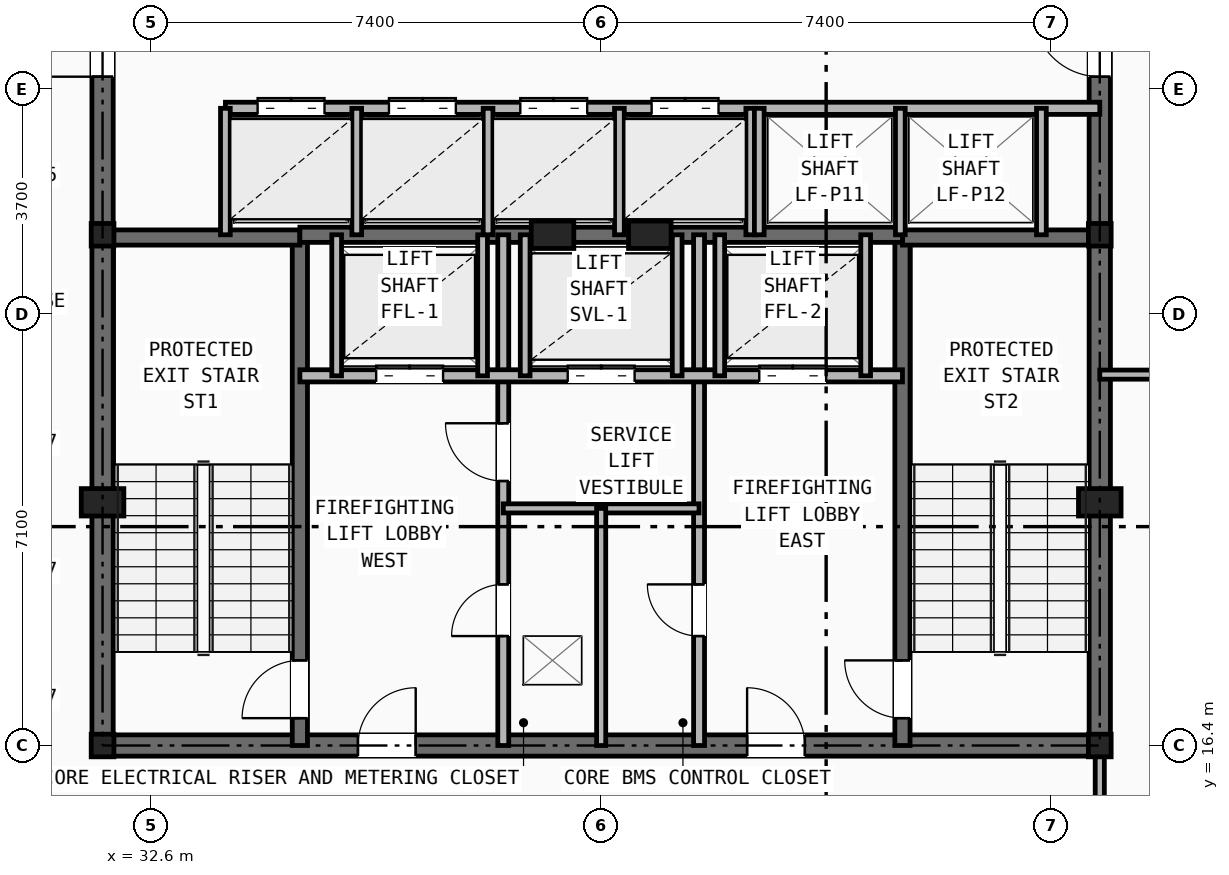
"""IFC4 building model, lengths in metres.
Left out: names, types, materials, properties, quantities, classifications, styles, units other than length and angle.
Written with IfcOpenShell. Run it as: python <this file> out.ifc"""

import sys

from ifc_helpers import new_model, si_unit, direction, frame, frame_2d, origin, origin_2d, place, context, subcontext, project, spatial, rectangle, i_section, extrude, element, fill, save


model = new_model("IFC4")
c1 = context("Model", 3, precision=1e-05, world=origin(), true_north=direction((0.0, 1.0)))
c2 = subcontext(c1, "Body", "Model", "MODEL_VIEW")
j1 = project(units=[si_unit("LENGTHUNIT", "METRE"), si_unit("PLANEANGLEUNIT", "RADIAN")], contexts=[c1])
p1 = place(None, origin())
s1 = spatial("IfcSite", under=j1, at=p1, CompositionType="ELEMENT")
p2 = place(p1, origin())
s2 = spatial("IfcBuilding", under=s1, at=p2, CompositionType="ELEMENT")
p3 = place(p2, frame((0.0, 0.0, 196.5)))
s3 = spatial("IfcBuildingStorey", under=s2, at=p3, CompositionType="ELEMENT", Elevation=196.5)
for number, where, z_axis, x_axis in (
    (1, (31.8, 16.4, 0.0), (0.0, 0.0, 1.0), (1.0, 0.0, 0.0)),
    (2, (48.2, 16.4, 0.0), (0.0, 0.0, 1.0), (1.0, 0.0, 0.0)),
    (3, (31.8, 24.8, 0.0), (0.0, 0.0, 1.0), (1.0, 0.0, 0.0)),
    (4, (48.2, 24.8, 0.0), (0.0, 0.0, 1.0), (1.0, 0.0, 0.0)),
):
    element("IfcColumn", number, at=place(p3, frame(where, z_axis=z_axis, x_axis=x_axis)), inside=s3, PredefinedType="COLUMN", context=c2, shape_type="SweptSolid", body=[
        extrude(i_section(OverallWidth=0.374, OverallDepth=0.372, WebThickness=0.016, FlangeThickness=0.026, at=origin_2d()), origin(), (0.0, 0.0, 1.0), 4.2),
    ])
for number, where, z_axis, x_axis in (
    (5, (31.8, 20.4, 0.0), (0.0, 0.0, 1.0), (1.0, 0.0, 0.0)),
    (6, (48.2, 20.4, 0.0), (0.0, 0.0, 1.0), (1.0, 0.0, 0.0)),
    (7, (39.2, 24.8, 0.0), (0.0, 0.0, 1.0), (1.0, 0.0, 0.0)),
    (8, (40.8, 24.8, 0.0), (0.0, 0.0, 1.0), (1.0, 0.0, 0.0)),
):
    element("IfcColumn", number, at=place(p3, frame(where, z_axis=z_axis, x_axis=x_axis)), inside=s3, PredefinedType="PILASTER", context=c2, shape_type="SweptSolid", body=[
        extrude(rectangle(XDim=0.7, YDim=0.45, at=origin_2d()), origin(), (0.0, 0.0, 1.0), 4.2),
    ])
p4 = place(p3, frame((31.8, 16.4, 0.0), z_axis=(0.0, 0.0, 1.0), x_axis=(1.0, 0.0, 0.0)))
e9 = element("IfcWall", 9, at=p4, inside=s3, PredefinedType="SHEAR", context=c2, shape_type="SweptSolid", body=[
    extrude(rectangle(XDim=16.4, YDim=0.35, at=frame_2d((8.2, 0.0))), origin(), (0.0, 0.0, 1.0), 3.94),
])
p5 = place(p4, frame((4.2, 0.0, 0.0)))
e10 = element("IfcOpeningElement", 10, at=p5, cuts=e9, PredefinedType="OPENING", context=c2, shape_type="SweptSolid", body=[
    extrude(rectangle(XDim=0.95, YDim=2.1, at=frame_2d((0.475, 1.05))), frame((0.0, 0.185, 0.0), z_axis=(0.0, -1.0, 0.0), x_axis=(1.0, 0.0, 0.0)), (0.0, 0.0, 1.0), 0.37),
])
p6 = place(p4, frame((10.6, 0.0, 0.0)))
e11 = element("IfcOpeningElement", 11, at=p6, cuts=e9, PredefinedType="OPENING", context=c2, shape_type="SweptSolid", body=[
    extrude(rectangle(XDim=0.95, YDim=2.1, at=frame_2d((0.475, 1.05))), frame((0.0, 0.185, 0.0), z_axis=(0.0, -1.0, 0.0), x_axis=(1.0, 0.0, 0.0)), (0.0, 0.0, 1.0), 0.37),
])
p7 = place(p3, frame((31.8, 16.4, 0.0), z_axis=(0.0, 0.0, 1.0), x_axis=(0.0, 1.0, 0.0)))
e12 = element("IfcWall", 12, at=p7, inside=s3, PredefinedType="SHEAR", context=c2, shape_type="SweptSolid", body=[
    extrude(rectangle(XDim=14.8, YDim=0.35, at=frame_2d((7.4, 0.0))), origin(), (0.0, 0.0, 1.0), 3.94),
])
p8 = place(p7, frame((11.0, 0.0, 0.0)))
e13 = element("IfcOpeningElement", 13, at=p8, cuts=e12, PredefinedType="OPENING", context=c2, shape_type="SweptSolid", body=[
    extrude(rectangle(XDim=1.1, YDim=2.15, at=frame_2d((0.55, 1.075))), frame((0.0, 0.185, 0.0), z_axis=(0.0, -1.0, 0.0), x_axis=(1.0, 0.0, 0.0)), (0.0, 0.0, 1.0), 0.37),
])
p9 = place(p3, frame((48.2, 16.4, 0.0), z_axis=(0.0, 0.0, 1.0), x_axis=(0.0, 1.0, 0.0)))
e14 = element("IfcWall", 14, at=p9, inside=s3, PredefinedType="SHEAR", context=c2, shape_type="SweptSolid", body=[
    extrude(rectangle(XDim=14.8, YDim=0.35, at=frame_2d((7.4, 0.0))), origin(), (0.0, 0.0, 1.0), 3.94),
])
p10 = place(p9, frame((11.0, 0.0, 0.0)))
e15 = element("IfcOpeningElement", 15, at=p10, cuts=e14, PredefinedType="OPENING", context=c2, shape_type="SweptSolid", body=[
    extrude(rectangle(XDim=1.1, YDim=2.15, at=frame_2d((0.55, 1.075))), frame((0.0, 0.185, 0.0), z_axis=(0.0, -1.0, 0.0), x_axis=(1.0, 0.0, 0.0)), (0.0, 0.0, 1.0), 0.37),
])
p11 = place(p3, frame((35.045, 16.4, 0.0), z_axis=(0.0, 0.0, 1.0), x_axis=(0.0, 1.0, 0.0)))
e16 = element("IfcWall", 16, at=p11, inside=s3, PredefinedType="SHEAR", context=c2, shape_type="SweptSolid", body=[
    extrude(rectangle(XDim=8.4, YDim=0.25, at=frame_2d((4.2, 0.0))), origin(), (0.0, 0.0, 1.0), 3.94),
])
p12 = place(p11, frame((0.45, 0.0, 0.0)))
e17 = element("IfcOpeningElement", 17, at=p12, cuts=e16, PredefinedType="OPENING", context=c2, shape_type="SweptSolid", body=[
    extrude(rectangle(XDim=0.95, YDim=2.1, at=frame_2d((0.475, 1.05))), frame((0.0, 0.135, 0.0), z_axis=(0.0, -1.0, 0.0), x_axis=(1.0, 0.0, 0.0)), (0.0, 0.0, 1.0), 0.27),
])
p13 = place(p3, frame((31.8, 24.755, 0.0), z_axis=(0.0, 0.0, 1.0), x_axis=(1.0, 0.0, 0.0)))
e18 = element("IfcWall", 18, at=p13, inside=s3, PredefinedType="SHEAR", context=c2, shape_type="SweptSolid", body=[
    extrude(rectangle(XDim=3.245, YDim=0.25, at=frame_2d((1.623, 0.0))), origin(), (0.0, 0.0, 1.0), 3.94),
])
p14 = place(p3, frame((44.955, 16.4, 0.0), z_axis=(0.0, 0.0, 1.0), x_axis=(0.0, 1.0, 0.0)))
e19 = element("IfcWall", 19, at=p14, inside=s3, PredefinedType="SHEAR", context=c2, shape_type="SweptSolid", body=[
    extrude(rectangle(XDim=8.4, YDim=0.25, at=frame_2d((4.2, 0.0))), origin(), (0.0, 0.0, 1.0), 3.94),
])
p15 = place(p14, frame((0.45, 0.0, 0.0)))
e20 = element("IfcOpeningElement", 20, at=p15, cuts=e19, PredefinedType="OPENING", context=c2, shape_type="SweptSolid", body=[
    extrude(rectangle(XDim=0.95, YDim=2.1, at=frame_2d((0.475, 1.05))), frame((0.0, 0.135, 0.0), z_axis=(0.0, -1.0, 0.0), x_axis=(1.0, 0.0, 0.0)), (0.0, 0.0, 1.0), 0.27),
])
p16 = place(p3, frame((44.955, 24.755, 0.0), z_axis=(0.0, 0.0, 1.0), x_axis=(1.0, 0.0, 0.0)))
e21 = element("IfcWall", 21, at=p16, inside=s3, PredefinedType="SHEAR", context=c2, shape_type="SweptSolid", body=[
    extrude(rectangle(XDim=3.245, YDim=0.25, at=frame_2d((1.623, 0.0))), origin(), (0.0, 0.0, 1.0), 3.94),
])
p17 = place(p3, frame((35.045, 24.8, 0.0), z_axis=(0.0, 0.0, 1.0), x_axis=(1.0, 0.0, 0.0)))
e22 = element("IfcWall", 22, at=p17, inside=s3, PredefinedType="SHEAR", context=c2, shape_type="SweptSolid", body=[
    extrude(rectangle(XDim=9.91, YDim=0.25, at=frame_2d((4.955, 0.0))), origin(), (0.0, 0.0, 1.0), 3.94),
])
p18 = place(p3, frame((38.39, 16.4, 0.0), z_axis=(0.0, 0.0, 1.0), x_axis=(0.0, 1.0, 0.0)))
e23 = element("IfcWall", 23, at=p18, inside=s3, PredefinedType="PARTITIONING", context=c2, shape_type="SweptSolid", body=[
    extrude(rectangle(XDim=8.4, YDim=0.18, at=frame_2d((4.2, 0.0))), origin(), (0.0, 0.0, 1.0), 3.395),
])
p19 = place(p18, frame((1.8, 0.0, 0.0)))
e24 = element("IfcOpeningElement", 24, at=p19, cuts=e23, PredefinedType="OPENING", context=c2, shape_type="SweptSolid", body=[
    extrude(rectangle(XDim=0.85, YDim=2.05, at=frame_2d((0.425, 1.025))), frame((0.0, 0.1, 0.0), z_axis=(0.0, -1.0, 0.0), x_axis=(1.0, 0.0, 0.0)), (0.0, 0.0, 1.0), 0.2),
])
p20 = place(p18, frame((4.35, 0.0, 0.0)))
e25 = element("IfcOpeningElement", 25, at=p20, cuts=e23, PredefinedType="OPENING", context=c2, shape_type="SweptSolid", body=[
    extrude(rectangle(XDim=0.95, YDim=2.1, at=frame_2d((0.475, 1.05))), frame((0.0, 0.1, 0.0), z_axis=(0.0, -1.0, 0.0), x_axis=(1.0, 0.0, 0.0)), (0.0, 0.0, 1.0), 0.2),
])
p21 = place(p3, frame((41.61, 16.4, 0.0), z_axis=(0.0, 0.0, 1.0), x_axis=(0.0, 1.0, 0.0)))
e26 = element("IfcWall", 26, at=p21, inside=s3, PredefinedType="PARTITIONING", context=c2, shape_type="SweptSolid", body=[
    extrude(rectangle(XDim=8.4, YDim=0.18, at=frame_2d((4.2, 0.0))), origin(), (0.0, 0.0, 1.0), 3.395),
])
p22 = place(p21, frame((1.8, 0.0, 0.0)))
e27 = element("IfcOpeningElement", 27, at=p22, cuts=e26, PredefinedType="OPENING", context=c2, shape_type="SweptSolid", body=[
    extrude(rectangle(XDim=0.85, YDim=2.05, at=frame_2d((0.425, 1.025))), frame((0.0, 0.1, 0.0), z_axis=(0.0, -1.0, 0.0), x_axis=(1.0, 0.0, 0.0)), (0.0, 0.0, 1.0), 0.2),
])
p23 = place(p3, frame((35.045, 22.48, 0.0), z_axis=(0.0, 0.0, 1.0), x_axis=(1.0, 0.0, 0.0)))
e28 = element("IfcWall", 28, at=p23, inside=s3, PredefinedType="SOLIDWALL", context=c2, shape_type="SweptSolid", body=[
    extrude(rectangle(XDim=9.91, YDim=0.2, at=frame_2d((4.955, 0.0))), origin(), (0.0, 0.0, 1.0), 3.94),
])
p24 = place(p23, frame((1.255, 0.0, 0.0)))
e29 = element("IfcOpeningElement", 29, at=p24, cuts=e28, PredefinedType="OPENING", context=c2, shape_type="SweptSolid", body=[
    extrude(rectangle(XDim=1.1, YDim=2.15, at=frame_2d((0.55, 1.075))), frame((0.0, 0.11, 0.0), z_axis=(0.0, -1.0, 0.0), x_axis=(1.0, 0.0, 0.0)), (0.0, 0.0, 1.0), 0.22),
])
p25 = place(p23, frame((7.555, 0.0, 0.0)))
e30 = element("IfcOpeningElement", 30, at=p25, cuts=e28, PredefinedType="OPENING", context=c2, shape_type="SweptSolid", body=[
    extrude(rectangle(XDim=1.1, YDim=2.15, at=frame_2d((0.55, 1.075))), frame((0.0, 0.11, 0.0), z_axis=(0.0, -1.0, 0.0), x_axis=(1.0, 0.0, 0.0)), (0.0, 0.0, 1.0), 0.22),
])
p26 = place(p23, frame((4.405, 0.0, 0.0)))
e31 = element("IfcOpeningElement", 31, at=p26, cuts=e28, PredefinedType="OPENING", context=c2, shape_type="SweptSolid", body=[
    extrude(rectangle(XDim=1.1, YDim=2.15, at=frame_2d((0.55, 1.075))), frame((0.0, 0.11, 0.0), z_axis=(0.0, -1.0, 0.0), x_axis=(1.0, 0.0, 0.0)), (0.0, 0.0, 1.0), 0.22),
])
p27 = place(p3, frame((38.39, 20.3, 0.0), z_axis=(0.0, 0.0, 1.0), x_axis=(1.0, 0.0, 0.0)))
e32 = element("IfcWall", 32, at=p27, inside=s3, PredefinedType="PARTITIONING", context=c2, shape_type="SweptSolid", body=[
    extrude(rectangle(XDim=3.22, YDim=0.15, at=frame_2d((1.61, 0.0))), origin(), (0.0, 0.0, 1.0), 3.94),
])
p28 = place(p3, frame((40.0, 16.4, 0.0), z_axis=(0.0, 0.0, 1.0), x_axis=(0.0, 1.0, 0.0)))
e33 = element("IfcWall", 33, at=p28, inside=s3, PredefinedType="PARTITIONING", context=c2, shape_type="SweptSolid", body=[
    extrude(rectangle(XDim=3.9, YDim=0.15, at=frame_2d((1.95, 0.0))), origin(), (0.0, 0.0, 1.0), 3.395),
])
for number, where, z_axis, x_axis in (
    (34, (35.65, 22.48, 0.0), (0.0, 0.0, 1.0), (0.0, 1.0, 0.0)),
    (35, (38.05, 22.48, 0.0), (0.0, 0.0, 1.0), (0.0, 1.0, 0.0)),
    (36, (41.95, 22.48, 0.0), (0.0, 0.0, 1.0), (0.0, 1.0, 0.0)),
    (37, (44.35, 22.48, 0.0), (0.0, 0.0, 1.0), (0.0, 1.0, 0.0)),
    (38, (38.75, 22.48, 0.0), (0.0, 0.0, 1.0), (0.0, 1.0, 0.0)),
    (39, (41.25, 22.48, 0.0), (0.0, 0.0, 1.0), (0.0, 1.0, 0.0)),
):
    element("IfcWall", number, at=place(p3, frame(where, z_axis=z_axis, x_axis=x_axis)), inside=s3, PredefinedType="SOLIDWALL", context=c2, shape_type="SweptSolid", body=[
        extrude(rectangle(XDim=2.32, YDim=0.16, at=frame_2d((1.16, 0.0))), origin(), (0.0, 0.0, 1.0), 3.94),
    ])
p29 = place(p3, frame((33.82, 26.88, 0.0), z_axis=(0.0, 0.0, 1.0), x_axis=(1.0, 0.0, 0.0)))
e40 = element("IfcWall", 40, at=p29, inside=s3, PredefinedType="SOLIDWALL", context=c2, shape_type="SweptSolid", body=[
    extrude(rectangle(XDim=14.38, YDim=0.2, at=frame_2d((7.19, 0.0))), origin(), (0.0, 0.0, 1.0), 3.395),
])
p30 = place(p29, frame((0.53, 0.0, 0.0)))
e41 = element("IfcOpeningElement", 41, at=p30, cuts=e40, PredefinedType="OPENING", context=c2, shape_type="SweptSolid", body=[
    extrude(rectangle(XDim=1.1, YDim=2.15, at=frame_2d((0.55, 1.075))), frame((0.0, 0.11, 0.0), z_axis=(0.0, -1.0, 0.0), x_axis=(1.0, 0.0, 0.0)), (0.0, 0.0, 1.0), 0.22),
])
p31 = place(p29, frame((2.69, 0.0, 0.0)))
e42 = element("IfcOpeningElement", 42, at=p31, cuts=e40, PredefinedType="OPENING", context=c2, shape_type="SweptSolid", body=[
    extrude(rectangle(XDim=1.1, YDim=2.15, at=frame_2d((0.55, 1.075))), frame((0.0, 0.11, 0.0), z_axis=(0.0, -1.0, 0.0), x_axis=(1.0, 0.0, 0.0)), (0.0, 0.0, 1.0), 0.22),
])
p32 = place(p29, frame((4.85, 0.0, 0.0)))
e43 = element("IfcOpeningElement", 43, at=p32, cuts=e40, PredefinedType="OPENING", context=c2, shape_type="SweptSolid", body=[
    extrude(rectangle(XDim=1.1, YDim=2.15, at=frame_2d((0.55, 1.075))), frame((0.0, 0.11, 0.0), z_axis=(0.0, -1.0, 0.0), x_axis=(1.0, 0.0, 0.0)), (0.0, 0.0, 1.0), 0.22),
])
p33 = place(p29, frame((7.01, 0.0, 0.0)))
e44 = element("IfcOpeningElement", 44, at=p33, cuts=e40, PredefinedType="OPENING", context=c2, shape_type="SweptSolid", body=[
    extrude(rectangle(XDim=1.1, YDim=2.15, at=frame_2d((0.55, 1.075))), frame((0.0, 0.11, 0.0), z_axis=(0.0, -1.0, 0.0), x_axis=(1.0, 0.0, 0.0)), (0.0, 0.0, 1.0), 0.22),
])
for number, where, z_axis, x_axis in (
    (45, (33.82, 24.8, 0.0), (0.0, 0.0, 1.0), (0.0, 1.0, 0.0)),
    (46, (35.98, 24.8, 0.0), (0.0, 0.0, 1.0), (0.0, 1.0, 0.0)),
    (47, (38.14, 24.8, 0.0), (0.0, 0.0, 1.0), (0.0, 1.0, 0.0)),
    (48, (40.3, 24.8, 0.0), (0.0, 0.0, 1.0), (0.0, 1.0, 0.0)),
    (49, (42.46, 24.8, 0.0), (0.0, 0.0, 1.0), (0.0, 1.0, 0.0)),
    (50, (42.6, 24.8, 0.0), (0.0, 0.0, 1.0), (0.0, 1.0, 0.0)),
    (51, (44.92, 24.8, 0.0), (0.0, 0.0, 1.0), (0.0, 1.0, 0.0)),
    (52, (47.24, 24.8, 0.0), (0.0, 0.0, 1.0), (0.0, 1.0, 0.0)),
):
    element("IfcWall", number, at=place(p3, frame(where, z_axis=z_axis, x_axis=x_axis)), inside=s3, PredefinedType="SOLIDWALL", context=c2, shape_type="SweptSolid", body=[
        extrude(rectangle(XDim=2.08, YDim=0.16, at=frame_2d((1.04, 0.0))), origin(), (0.0, 0.0, 1.0), 3.94),
    ])
p34 = place(p3, frame((48.2, 14.1, 0.0), z_axis=(0.0, 0.0, 1.0), x_axis=(0.0, 1.0, 0.0)))
e53 = element("IfcWall", 53, at=p34, inside=s3, PredefinedType="PARTITIONING", context=c2, shape_type="SweptSolid", body=[
    extrude(rectangle(XDim=2.3, YDim=0.15, at=frame_2d((1.15, 0.0))), origin(), (0.0, 0.0, 1.0), 3.395),
])
p35 = place(p3, frame((48.2, 22.5, 0.0), z_axis=(0.0, 0.0, 1.0), x_axis=(1.0, 0.0, 0.0)))
e54 = element("IfcWall", 54, at=p35, inside=s3, PredefinedType="PARTITIONING", context=c2, shape_type="SweptSolid", body=[
    extrude(rectangle(XDim=12.316, YDim=0.15, at=frame_2d((6.158, 0.0))), origin(), (0.0, 0.0, 1.0), 3.051),
])
p36 = place(p35, frame((1.4, 0.0, 0.0)))
e55 = element("IfcOpeningElement", 55, at=p36, cuts=e54, PredefinedType="OPENING", context=c2, shape_type="SweptSolid", body=[
    extrude(rectangle(XDim=0.95, YDim=2.1, at=frame_2d((0.475, 1.05))), frame((0.0, 0.085, 0.0), z_axis=(0.0, -1.0, 0.0), x_axis=(1.0, 0.0, 0.0)), (0.0, 0.0, 1.0), 0.17),
])
p37 = place(p19, origin())
e56 = element("IfcDoor", 56, at=p37, inside=s3, OperationType="SINGLE_SWING_LEFT", PredefinedType="DOOR", context=c2, shape_type="SweptSolid", body=[
    extrude(rectangle(XDim=0.85, YDim=2.05, at=frame_2d((0.425, 1.025))), frame((0.0, 0.025, 0.0), z_axis=(0.0, -1.0, 0.0), x_axis=(1.0, 0.0, 0.0)), (0.0, 0.0, 1.0), 0.05),
])
fill(e24, e56)
p38 = place(p22, origin())
e57 = element("IfcDoor", 57, at=p38, inside=s3, OperationType="SINGLE_SWING_RIGHT", PredefinedType="DOOR", context=c2, shape_type="SweptSolid", body=[
    extrude(rectangle(XDim=0.85, YDim=2.05, at=frame_2d((0.425, 1.025))), frame((0.0, 0.025, 0.0), z_axis=(0.0, -1.0, 0.0), x_axis=(1.0, 0.0, 0.0)), (0.0, 0.0, 1.0), 0.05),
])
fill(e27, e57)
p39 = place(p20, origin())
e58 = element("IfcDoor", 58, at=p39, inside=s3, OperationType="SINGLE_SWING_RIGHT", PredefinedType="DOOR", context=c2, shape_type="SweptSolid", body=[
    extrude(rectangle(XDim=0.95, YDim=2.1, at=frame_2d((0.475, 1.05))), frame((0.0, 0.025, 0.0), z_axis=(0.0, -1.0, 0.0), x_axis=(1.0, 0.0, 0.0)), (0.0, 0.0, 1.0), 0.05),
])
fill(e25, e58)
p40 = place(p12, origin())
e59 = element("IfcDoor", 59, at=p40, inside=s3, OperationType="SINGLE_SWING_LEFT", PredefinedType="DOOR", context=c2, shape_type="SweptSolid", body=[
    extrude(rectangle(XDim=0.95, YDim=2.1, at=frame_2d((0.475, 1.05))), frame((0.0, 0.025, 0.0), z_axis=(0.0, -1.0, 0.0), x_axis=(1.0, 0.0, 0.0)), (0.0, 0.0, 1.0), 0.05),
])
fill(e17, e59)
p41 = place(p15, origin())
e60 = element("IfcDoor", 60, at=p41, inside=s3, OperationType="SINGLE_SWING_RIGHT", PredefinedType="DOOR", context=c2, shape_type="SweptSolid", body=[
    extrude(rectangle(XDim=0.95, YDim=2.1, at=frame_2d((0.475, 1.05))), frame((0.0, 0.025, 0.0), z_axis=(0.0, -1.0, 0.0), x_axis=(1.0, 0.0, 0.0)), (0.0, 0.0, 1.0), 0.05),
])
fill(e20, e60)
p42 = place(p5, origin())
e61 = element("IfcDoor", 61, at=p42, inside=s3, OperationType="SINGLE_SWING_RIGHT", PredefinedType="DOOR", context=c2, shape_type="SweptSolid", body=[
    extrude(rectangle(XDim=0.95, YDim=2.1, at=frame_2d((0.475, 1.05))), frame((0.0, 0.025, 0.0), z_axis=(0.0, -1.0, 0.0), x_axis=(1.0, 0.0, 0.0)), (0.0, 0.0, 1.0), 0.05),
])
fill(e10, e61)
p43 = place(p6, origin())
e62 = element("IfcDoor", 62, at=p43, inside=s3, OperationType="SINGLE_SWING_LEFT", PredefinedType="DOOR", context=c2, shape_type="SweptSolid", body=[
    extrude(rectangle(XDim=0.95, YDim=2.1, at=frame_2d((0.475, 1.05))), frame((0.0, 0.025, 0.0), z_axis=(0.0, -1.0, 0.0), x_axis=(1.0, 0.0, 0.0)), (0.0, 0.0, 1.0), 0.05),
])
fill(e11, e62)
p44 = place(p24, origin())
e63 = element("IfcDoor", 63, at=p44, inside=s3, OperationType="DOUBLE_DOOR_SLIDING", PredefinedType="DOOR", context=c2, shape_type="SweptSolid", body=[
    extrude(rectangle(XDim=1.1, YDim=2.15, at=frame_2d((0.55, 1.075))), frame((0.0, 0.025, 0.0), z_axis=(0.0, -1.0, 0.0), x_axis=(1.0, 0.0, 0.0)), (0.0, 0.0, 1.0), 0.05),
])
fill(e29, e63)
p45 = place(p25, origin())
e64 = element("IfcDoor", 64, at=p45, inside=s3, OperationType="DOUBLE_DOOR_SLIDING", PredefinedType="DOOR", context=c2, shape_type="SweptSolid", body=[
    extrude(rectangle(XDim=1.1, YDim=2.15, at=frame_2d((0.55, 1.075))), frame((0.0, 0.025, 0.0), z_axis=(0.0, -1.0, 0.0), x_axis=(1.0, 0.0, 0.0)), (0.0, 0.0, 1.0), 0.05),
])
fill(e30, e64)
p46 = place(p26, origin())
e65 = element("IfcDoor", 65, at=p46, inside=s3, OperationType="DOUBLE_DOOR_SLIDING", PredefinedType="DOOR", context=c2, shape_type="SweptSolid", body=[
    extrude(rectangle(XDim=1.1, YDim=2.15, at=frame_2d((0.55, 1.075))), frame((0.0, 0.025, 0.0), z_axis=(0.0, -1.0, 0.0), x_axis=(1.0, 0.0, 0.0)), (0.0, 0.0, 1.0), 0.05),
])
fill(e31, e65)
p47 = place(p8, origin())
e66 = element("IfcDoor", 66, at=p47, inside=s3, OperationType="SINGLE_SWING_LEFT", PredefinedType="DOOR", context=c2, shape_type="SweptSolid", body=[
    extrude(rectangle(XDim=1.1, YDim=2.15, at=frame_2d((0.55, 1.075))), frame((0.0, 0.025, 0.0), z_axis=(0.0, -1.0, 0.0), x_axis=(1.0, 0.0, 0.0)), (0.0, 0.0, 1.0), 0.05),
])
fill(e13, e66)
p48 = place(p10, origin())
e67 = element("IfcDoor", 67, at=p48, inside=s3, OperationType="SINGLE_SWING_RIGHT", PredefinedType="DOOR", context=c2, shape_type="SweptSolid", body=[
    extrude(rectangle(XDim=1.1, YDim=2.15, at=frame_2d((0.55, 1.075))), frame((0.0, 0.025, 0.0), z_axis=(0.0, -1.0, 0.0), x_axis=(1.0, 0.0, 0.0)), (0.0, 0.0, 1.0), 0.05),
])
fill(e15, e67)
p49 = place(p30, origin())
e68 = element("IfcDoor", 68, at=p49, inside=s3, OperationType="DOUBLE_DOOR_SLIDING", PredefinedType="DOOR", context=c2, shape_type="SweptSolid", body=[
    extrude(rectangle(XDim=1.1, YDim=2.15, at=frame_2d((0.55, 1.075))), frame((0.0, 0.025, 0.0), z_axis=(0.0, -1.0, 0.0), x_axis=(1.0, 0.0, 0.0)), (0.0, 0.0, 1.0), 0.05),
])
fill(e41, e68)
p50 = place(p31, origin())
e69 = element("IfcDoor", 69, at=p50, inside=s3, OperationType="DOUBLE_DOOR_SLIDING", PredefinedType="DOOR", context=c2, shape_type="SweptSolid", body=[
    extrude(rectangle(XDim=1.1, YDim=2.15, at=frame_2d((0.55, 1.075))), frame((0.0, 0.025, 0.0), z_axis=(0.0, -1.0, 0.0), x_axis=(1.0, 0.0, 0.0)), (0.0, 0.0, 1.0), 0.05),
])
fill(e42, e69)
p51 = place(p32, origin())
e70 = element("IfcDoor", 70, at=p51, inside=s3, OperationType="DOUBLE_DOOR_SLIDING", PredefinedType="DOOR", context=c2, shape_type="SweptSolid", body=[
    extrude(rectangle(XDim=1.1, YDim=2.15, at=frame_2d((0.55, 1.075))), frame((0.0, 0.025, 0.0), z_axis=(0.0, -1.0, 0.0), x_axis=(1.0, 0.0, 0.0)), (0.0, 0.0, 1.0), 0.05),
])
fill(e43, e70)
p52 = place(p33, origin())
e71 = element("IfcDoor", 71, at=p52, inside=s3, OperationType="DOUBLE_DOOR_SLIDING", PredefinedType="DOOR", context=c2, shape_type="SweptSolid", body=[
    extrude(rectangle(XDim=1.1, YDim=2.15, at=frame_2d((0.55, 1.075))), frame((0.0, 0.025, 0.0), z_axis=(0.0, -1.0, 0.0), x_axis=(1.0, 0.0, 0.0)), (0.0, 0.0, 1.0), 0.05),
])
fill(e44, e71)
save(model, sys.argv[1])
